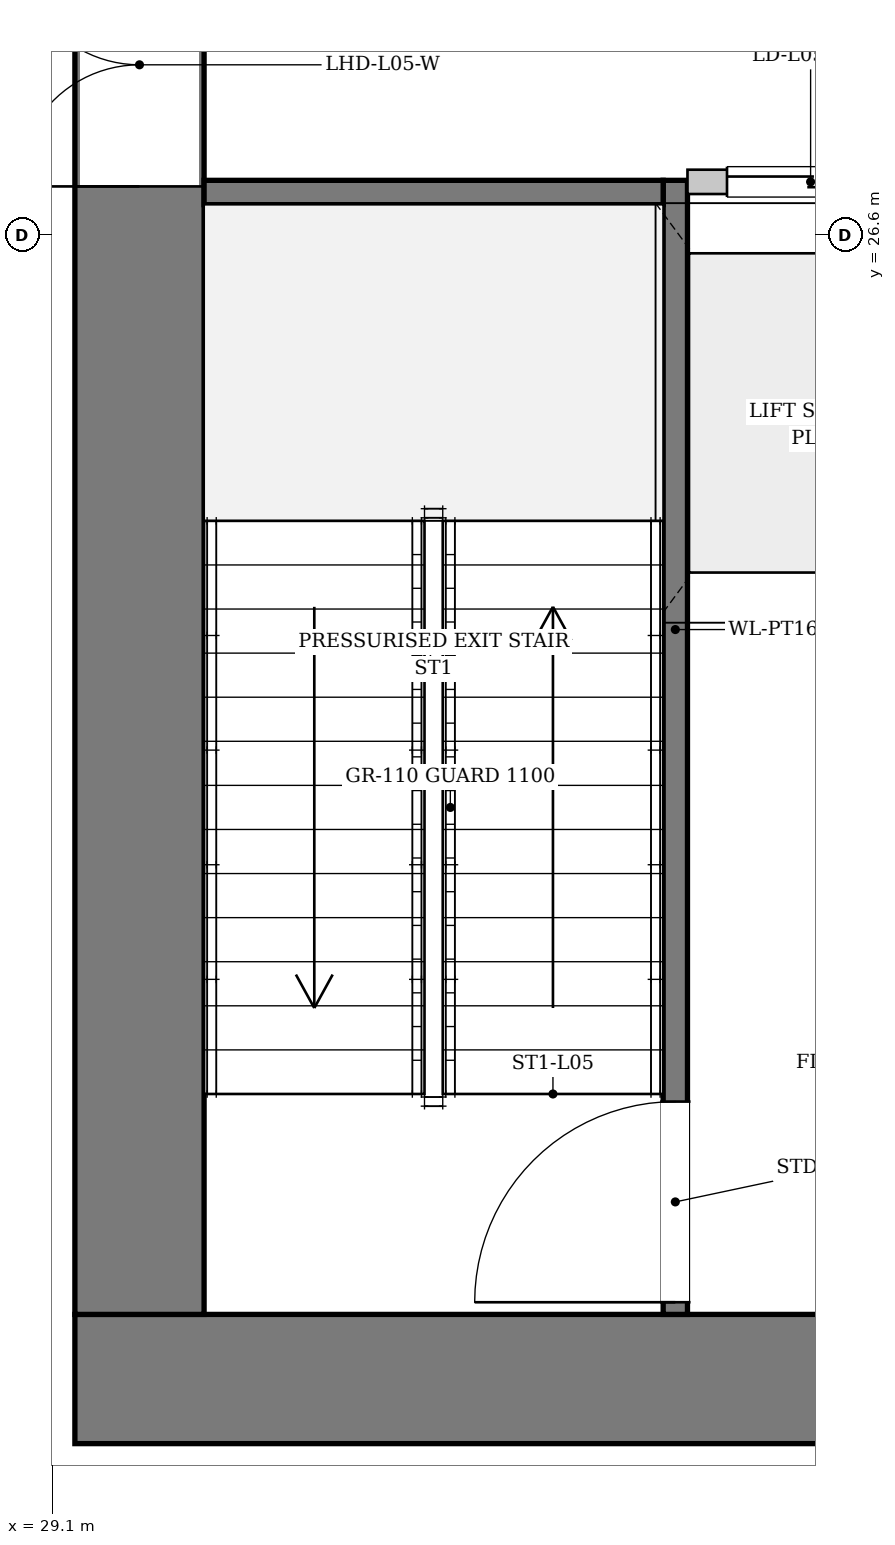
"""IFC4 building model, lengths in metres.
Left out: names, types, materials, properties, quantities, classifications, styles, units other than length and angle.
Written with IfcOpenShell. Run it as: python <this file> out.ifc"""

import sys

from ifc_helpers import new_model, si_unit, direction, frame, frame_2d, origin, place, context, subcontext, project, spatial, rectangle, extrude, source, transform, mapped, element, fill, save


model = new_model("IFC4")
c1 = context("Model", 3, precision=1e-05, world=origin(), true_north=direction((0.0, 1.0)))
c2 = subcontext(c1, "Body", "Model", "MODEL_VIEW")
j1 = project(units=[si_unit("LENGTHUNIT", "METRE"), si_unit("PLANEANGLEUNIT", "RADIAN")], contexts=[c1])
p1 = place(None, origin())
s1 = spatial("IfcSite", under=j1, at=p1, CompositionType="ELEMENT")
p2 = place(p1, origin())
s2 = spatial("IfcBuilding", under=s1, at=p2, CompositionType="ELEMENT")
p3 = place(p2, frame((0.0, 0.0, 24.6)))
s3 = spatial("IfcBuildingStorey", under=s2, at=p3, CompositionType="ELEMENT", Elevation=24.6)
p4 = place(p3, frame((46.75, 19.075, 0.0), z_axis=(0.0, 0.0, 1.0), x_axis=(-1.0, 0.0, 0.0)))
e1 = element("IfcWall", 1, at=p4, inside=s3, PredefinedType="SHEAR", context=c2, shape_type="SweptSolid", body=[
    extrude(rectangle(XDim=17.5, YDim=0.85, at=frame_2d((8.75, 0.0))), origin(), (0.0, 0.0, 1.0), 4.45),
])
p5 = place(p4, frame((4.95, 0.0, 0.0)))
e2 = element("IfcOpeningElement", 2, at=p5, cuts=e1, PredefinedType="OPENING", context=c2, shape_type="SweptSolid", body=[
    extrude(rectangle(XDim=1.12, YDim=2.25, at=frame_2d((0.56, 1.125))), frame((0.0, 0.435, 0.0), z_axis=(0.0, -1.0, 0.0), x_axis=(1.0, 0.0, 0.0)), (0.0, 0.0, 1.0), 0.87),
])
p6 = place(p4, frame((11.45, 0.0, 0.0)))
e3 = element("IfcOpeningElement", 3, at=p6, cuts=e1, PredefinedType="OPENING", context=c2, shape_type="SweptSolid", body=[
    extrude(rectangle(XDim=1.12, YDim=2.25, at=frame_2d((0.56, 1.125))), frame((0.0, 0.435, 0.0), z_axis=(0.0, -1.0, 0.0), x_axis=(1.0, 0.0, 0.0)), (0.0, 0.0, 1.0), 0.87),
])
p7 = place(p3, frame((29.675, 19.5, 0.0), z_axis=(0.0, 0.0, 1.0), x_axis=(0.0, 1.0, 0.0)))
e4 = element("IfcWall", 4, at=p7, inside=s3, PredefinedType="SHEAR", context=c2, shape_type="SweptSolid", body=[
    extrude(rectangle(XDim=14.2, YDim=0.85, at=frame_2d((7.1, 0.0))), origin(), (0.0, 0.0, 1.0), 4.45),
])
p8 = place(p7, frame((7.42, 0.0, 0.0)))
e5 = element("IfcOpeningElement", 5, at=p8, cuts=e4, PredefinedType="OPENING", context=c2, shape_type="SweptSolid", body=[
    extrude(rectangle(XDim=1.6, YDim=2.2, at=frame_2d((0.8, 1.1))), frame((0.0, 0.435, 0.0), z_axis=(0.0, -1.0, 0.0), x_axis=(1.0, 0.0, 0.0)), (0.0, 0.0, 1.0), 0.87),
])
p9 = place(p3, frame((33.2, 19.5, 0.0), z_axis=(0.0, 0.0, 1.0), x_axis=(0.0, 1.0, 0.0)))
e6 = element("IfcWall", 6, at=p9, inside=s3, PredefinedType="PARTITIONING", context=c2, shape_type="SweptSolid", body=[
    extrude(rectangle(XDim=7.46, YDim=0.16, at=frame_2d((3.73, 0.0))), origin(), (0.0, 0.0, 1.0), 4.45),
])
p10 = place(p9, frame((0.08, 0.0, 0.0)))
e7 = element("IfcOpeningElement", 7, at=p10, cuts=e6, PredefinedType="OPENING", context=c2, shape_type="SweptSolid", body=[
    extrude(rectangle(XDim=1.32, YDim=2.2, at=frame_2d((0.66, 1.1))), frame((0.0, 0.09, 0.0), z_axis=(0.0, -1.0, 0.0), x_axis=(1.0, 0.0, 0.0)), (0.0, 0.0, 1.0), 0.18),
])
p11 = place(p3, frame((30.1, 26.88, 0.0), z_axis=(0.0, 0.0, 1.0), x_axis=(1.0, 0.0, 0.0)))
e8 = element("IfcWall", 8, at=p11, inside=s3, PredefinedType="PARTITIONING", context=c2, shape_type="SweptSolid", body=[
    extrude(rectangle(XDim=3.02, YDim=0.16, at=frame_2d((1.51, 0.0))), origin(), (0.0, 0.0, 1.0), 4.45),
])
p12 = place(p3, frame((33.28, 24.49, 0.0), z_axis=(0.0, 0.0, 1.0), x_axis=(1.0, 0.0, 0.0)))
e9 = element("IfcWall", 9, at=p12, inside=s3, PredefinedType="PARTITIONING", context=c2, shape_type="SweptSolid", body=[
    extrude(rectangle(XDim=9.44, YDim=0.16, at=frame_2d((4.72, 0.0))), origin(), (0.0, 0.0, 1.0), 4.45),
])
p13 = place(p3, frame((33.28, 26.95, 0.0), z_axis=(0.0, 0.0, 1.0), x_axis=(1.0, 0.0, 0.0)))
e10 = element("IfcWall", 10, at=p13, inside=s3, PredefinedType="PARTITIONING", context=c2, shape_type="SweptSolid", body=[
    extrude(rectangle(XDim=9.44, YDim=0.16, at=frame_2d((4.72, 0.0))), origin(), (0.0, 0.0, 1.0), 4.45),
])
p14 = place(p13, frame((0.26, 0.0, 0.0)))
e11 = element("IfcOpeningElement", 11, at=p14, cuts=e10, PredefinedType="OPENING", context=c2, shape_type="SweptSolid", body=[
    extrude(rectangle(XDim=1.1, YDim=2.2, at=frame_2d((0.55, 1.1))), frame((0.0, 0.09, 0.0), z_axis=(0.0, -1.0, 0.0), x_axis=(1.0, 0.0, 0.0)), (0.0, 0.0, 1.0), 0.18),
])
p15 = place(p13, frame((2.01, 0.0, 0.0)))
e12 = element("IfcOpeningElement", 12, at=p15, cuts=e10, PredefinedType="OPENING", context=c2, shape_type="SweptSolid", body=[
    extrude(rectangle(XDim=1.1, YDim=2.2, at=frame_2d((0.55, 1.1))), frame((0.0, 0.09, 0.0), z_axis=(0.0, -1.0, 0.0), x_axis=(1.0, 0.0, 0.0)), (0.0, 0.0, 1.0), 0.18),
])
p16 = place(p13, frame((3.76, 0.0, 0.0)))
e13 = element("IfcOpeningElement", 13, at=p16, cuts=e10, PredefinedType="OPENING", context=c2, shape_type="SweptSolid", body=[
    extrude(rectangle(XDim=1.1, YDim=2.2, at=frame_2d((0.55, 1.1))), frame((0.0, 0.09, 0.0), z_axis=(0.0, -1.0, 0.0), x_axis=(1.0, 0.0, 0.0)), (0.0, 0.0, 1.0), 0.18),
])
p17 = place(p13, frame((5.51, 0.0, 0.0)))
e14 = element("IfcOpeningElement", 14, at=p17, cuts=e10, PredefinedType="OPENING", context=c2, shape_type="SweptSolid", body=[
    extrude(rectangle(XDim=1.1, YDim=2.2, at=frame_2d((0.55, 1.1))), frame((0.0, 0.09, 0.0), z_axis=(0.0, -1.0, 0.0), x_axis=(1.0, 0.0, 0.0)), (0.0, 0.0, 1.0), 0.18),
])
m1 = source(origin(), c2, "Body", "SweptSolid", [
    extrude(rectangle(XDim=1.6, YDim=2.2, at=frame_2d((0.8, 1.1))), frame((0.0, 0.025, 0.0), z_axis=(0.0, -1.0, 0.0), x_axis=(1.0, 0.0, 0.0)), (0.0, 0.0, 1.0), 0.05),
])
p18 = place(p8, origin())
e15 = element("IfcDoor", 15, at=p18, inside=s3, OperationType="DOUBLE_DOOR_SINGLE_SWING", PredefinedType="DOOR", context=c2, shape_type="MappedRepresentation", body=[
    mapped(m1, transform((0.0, 0.0, 0.0), x_axis=(1.0, 0.0, 0.0), y_axis=(0.0, 1.0, 0.0), z_axis=(0.0, 0.0, 1.0), scale=1.0)),
])
fill(e5, e15)
m2 = source(origin(), c2, "Body", "SweptSolid", [
    extrude(rectangle(XDim=1.32, YDim=2.2, at=frame_2d((0.66, 1.1))), frame((0.0, 0.025, 0.0), z_axis=(0.0, -1.0, 0.0), x_axis=(1.0, 0.0, 0.0)), (0.0, 0.0, 1.0), 0.05),
])
p19 = place(p10, origin())
e16 = element("IfcDoor", 16, at=p19, inside=s3, OperationType="SINGLE_SWING_LEFT", PredefinedType="DOOR", context=c2, shape_type="MappedRepresentation", body=[
    mapped(m2, transform((0.0, 0.0, 0.0), x_axis=(1.0, 0.0, 0.0), y_axis=(0.0, 1.0, 0.0), z_axis=(0.0, 0.0, 1.0), scale=1.0)),
])
fill(e7, e16)
m3 = source(origin(), c2, "Body", "SweptSolid", [
    extrude(rectangle(XDim=1.1, YDim=2.2, at=frame_2d((0.55, 1.1))), frame((0.0, 0.025, 0.0), z_axis=(0.0, -1.0, 0.0), x_axis=(1.0, 0.0, 0.0)), (0.0, 0.0, 1.0), 0.05),
])
p20 = place(p14, origin())
e17 = element("IfcDoor", 17, at=p20, inside=s3, OperationType="DOUBLE_DOOR_SLIDING", PredefinedType="DOOR", context=c2, shape_type="MappedRepresentation", body=[
    mapped(m3, transform((0.0, 0.0, 0.0), x_axis=(1.0, 0.0, 0.0), y_axis=(0.0, 1.0, 0.0), z_axis=(0.0, 0.0, 1.0), scale=1.0)),
])
fill(e11, e17)
save(model, sys.argv[1])
